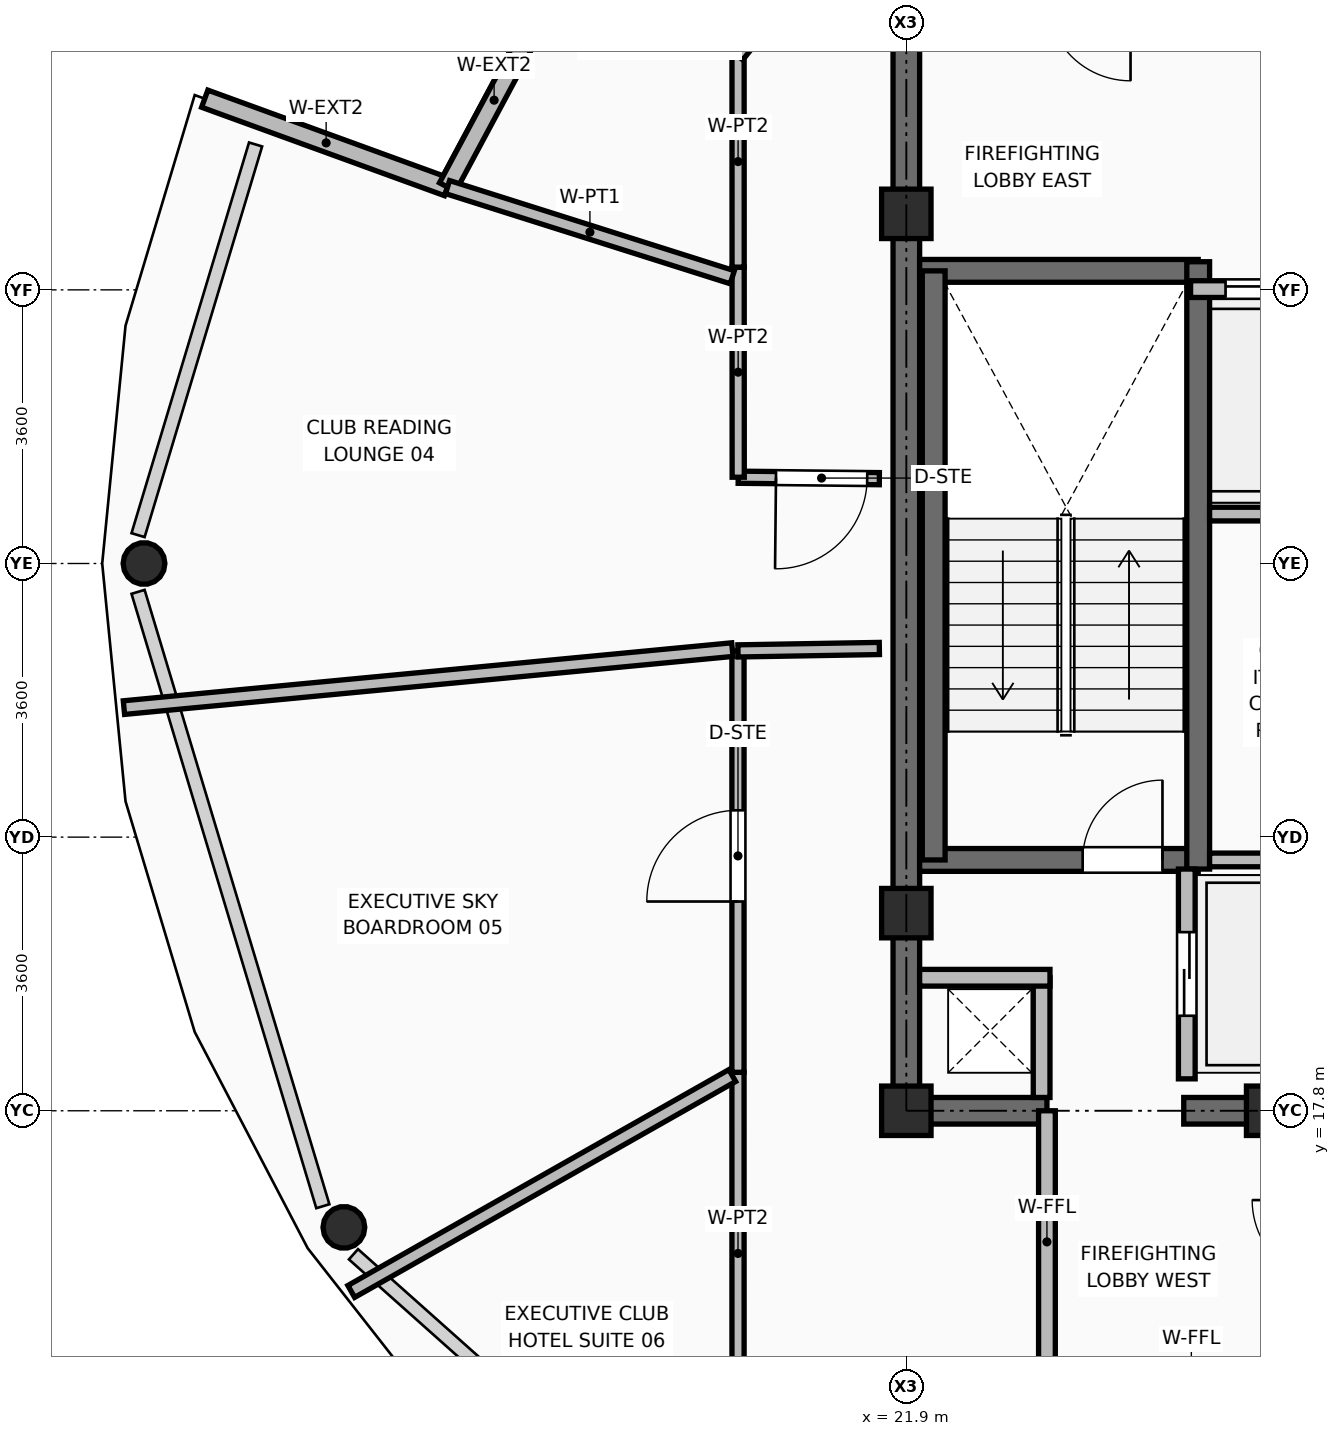
"""IFC4 building model, lengths in metres.
Left out: names, types, materials, properties, quantities, classifications, styles, units other than length and angle.
Written with IfcOpenShell. Run it as: python <this file> out.ifc"""

import sys

from ifc_helpers import new_model, si_unit, direction, frame, frame_2d, origin, origin_2d, place, context, subcontext, project, spatial, rectangle, hollow_circle, extrude, element, fill, save


model = new_model("IFC4")
c1 = context("Model", 3, precision=1e-05, world=origin(), true_north=direction((0.0, 1.0)))
c2 = subcontext(c1, "Body", "Model", "MODEL_VIEW")
j1 = project(units=[si_unit("LENGTHUNIT", "METRE"), si_unit("PLANEANGLEUNIT", "RADIAN")], contexts=[c1])
p1 = place(None, origin())
s1 = spatial("IfcSite", under=j1, at=p1, CompositionType="ELEMENT")
p2 = place(p1, origin())
s2 = spatial("IfcBuilding", under=s1, at=p2, CompositionType="ELEMENT")
p3 = place(p2, frame((0.0, 0.0, 275.1)))
s3 = spatial("IfcBuildingStorey", under=s2, at=p3, CompositionType="ELEMENT", Elevation=275.1)
for number, where, z_axis, x_axis in (
    (1, (21.9, 17.8, 0.0), (0.0, 0.0, 1.0), (1.0, 0.0, 0.0)),
    (2, (26.7, 17.8, 0.0), (0.0, 0.0, 1.0), (1.0, 0.0, 0.0)),
    (3, (21.9, 20.4, 0.0), (0.0, 0.0, 1.0), (1.0, 0.0, 0.0)),
    (4, (21.9, 29.6, 0.0), (0.0, 0.0, 1.0), (1.0, 0.0, 0.0)),
):
    element("IfcColumn", number, at=place(p3, frame(where, z_axis=z_axis, x_axis=x_axis)), inside=s3, PredefinedType="COLUMN", context=c2, shape_type="SweptSolid", body=[
        extrude(rectangle(XDim=0.65, YDim=0.65, at=origin_2d()), origin(), (0.0, 0.0, 1.0), 3.75),
    ])
p4 = place(p3, frame((11.87, 25.0, 0.0), z_axis=(0.022357971521, 0.0, 0.999750029312), x_axis=(0.0, 1.0, 0.0)))
e5 = element("IfcColumn", 5, at=p4, inside=s3, PredefinedType="COLUMN", context=c2, shape_type="SweptSolid", body=[
    extrude(hollow_circle(Radius=0.275, WallThickness=0.025, at=origin_2d()), origin(), (0.0, 0.0, 1.0), 3.571),
])
p5 = place(p3, frame((14.5, 16.266, 0.0), z_axis=(0.019349796045, 0.010050954129, 0.999762253595), x_axis=(-0.460957758055, 0.887422078432, 0.0)))
e6 = element("IfcColumn", 6, at=p5, inside=s3, PredefinedType="COLUMN", context=c2, shape_type="SweptSolid", body=[
    extrude(hollow_circle(Radius=0.275, WallThickness=0.025, at=origin_2d()), origin(), (0.0, 0.0, 1.0), 3.571),
])
p6 = place(p3, frame((15.864, 29.952, 0.0), z_axis=(0.0, 0.0, 1.0), x_axis=(-0.939675968745, 0.342065890968, 0.0)))
e7 = element("IfcWall", 7, at=p6, inside=s3, PredefinedType="SOLIDWALL", context=c2, shape_type="SweptSolid", body=[
    extrude(rectangle(XDim=3.4, YDim=0.24, at=frame_2d((1.7, 0.0))), origin(), (0.0, 0.0, 1.0), 3.57),
])
p7 = place(p3, frame((17.089, 32.239, 0.0), z_axis=(0.0, 0.0, 1.0), x_axis=(-0.472179632466, -0.881502350924, 0.0)))
e8 = element("IfcWall", 8, at=p7, inside=s3, PredefinedType="SOLIDWALL", context=c2, shape_type="SweptSolid", body=[
    extrude(rectangle(XDim=2.594, YDim=0.24, at=frame_2d((1.297, 0.0))), origin(), (0.0, 0.0, 1.0), 3.57),
])
p8 = place(p3, frame((21.725, 17.8, 0.0), z_axis=(0.0, 0.0, 1.0), x_axis=(1.0, 0.0, 0.0)))
e9 = element("IfcWall", 9, at=p8, inside=s3, PredefinedType="SHEAR", context=c2, shape_type="SweptSolid", body=[
    extrude(rectangle(XDim=2.025, YDim=0.35, at=frame_2d((1.012, 0.0))), origin(), (0.0, 0.0, 1.0), 3.57),
])
p9 = place(p3, frame((25.55, 17.8, 0.0), z_axis=(0.0, 0.0, 1.0), x_axis=(1.0, 0.0, 0.0)))
e10 = element("IfcWall", 10, at=p9, inside=s3, PredefinedType="SHEAR", context=c2, shape_type="SweptSolid", body=[
    extrude(rectangle(XDim=6.9, YDim=0.35, at=frame_2d((3.45, 0.0))), origin(), (0.0, 0.0, 1.0), 3.57),
])
p10 = place(p3, frame((21.9, 17.975, 0.0), z_axis=(0.0, 0.0, 1.0), x_axis=(0.0, 1.0, 0.0)))
e11 = element("IfcWall", 11, at=p10, inside=s3, PredefinedType="SHEAR", context=c2, shape_type="SweptSolid", body=[
    extrude(rectangle(XDim=14.3, YDim=0.35, at=frame_2d((7.15, 0.0))), origin(), (0.0, 0.0, 1.0), 3.57),
])
p11 = place(p3, frame((22.075, 21.1, 0.0), z_axis=(0.0, 0.0, 1.0), x_axis=(1.0, 0.0, 0.0)))
e12 = element("IfcWall", 12, at=p11, inside=s3, PredefinedType="SHEAR", context=c2, shape_type="SweptSolid", body=[
    extrude(rectangle(XDim=3.665, YDim=0.3, at=frame_2d((1.833, 0.0))), origin(), (0.0, 0.0, 1.0), 3.57),
])
p12 = place(p11, frame((2.145, 0.0, 0.0)))
e13 = element("IfcOpeningElement", 13, at=p12, cuts=e12, PredefinedType="OPENING", context=c2, shape_type="SweptSolid", body=[
    extrude(rectangle(XDim=1.05, YDim=2.1, at=frame_2d((0.525, 1.05))), frame((0.0, 0.16, 0.0), z_axis=(0.0, -1.0, 0.0), x_axis=(1.0, 0.0, 0.0)), (0.0, 0.0, 1.0), 0.32),
])
p13 = place(p3, frame((22.075, 28.85, 0.0), z_axis=(0.0, 0.0, 1.0), x_axis=(1.0, 0.0, 0.0)))
e14 = element("IfcWall", 14, at=p13, inside=s3, PredefinedType="SHEAR", context=c2, shape_type="SweptSolid", body=[
    extrude(rectangle(XDim=3.665, YDim=0.3, at=frame_2d((1.833, 0.0))), origin(), (0.0, 0.0, 1.0), 3.57),
])
p14 = place(p3, frame((25.74, 20.98, 0.0), z_axis=(0.0, 0.0, 1.0), x_axis=(0.0, 1.0, 0.0)))
e15 = element("IfcWall", 15, at=p14, inside=s3, PredefinedType="SHEAR", context=c2, shape_type="SweptSolid", body=[
    extrude(rectangle(XDim=7.99, YDim=0.3, at=frame_2d((3.995, 0.0))), origin(), (0.0, 0.0, 1.0), 3.57),
])
p15 = place(p3, frame((22.26, 21.1, 0.0), z_axis=(0.0, 0.0, 1.0), x_axis=(0.0, 1.0, 0.0)))
e16 = element("IfcWall", 16, at=p15, inside=s3, PredefinedType="SHEAR", context=c2, shape_type="SweptSolid", body=[
    extrude(rectangle(XDim=7.75, YDim=0.3, at=frame_2d((3.875, 0.0))), origin(), (0.0, 0.0, 1.0), 3.57),
])
p16 = place(p3, frame((23.68, 17.975, 0.0), z_axis=(0.0, 0.0, 1.0), x_axis=(0.0, 1.0, 0.0)))
e17 = element("IfcWall", 17, at=p16, inside=s3, PredefinedType="PARTITIONING", context=c2, shape_type="SweptSolid", body=[
    extrude(rectangle(XDim=1.575, YDim=0.22, at=frame_2d((0.788, 0.0))), origin(), (0.0, 0.0, 1.0), 3.132),
])
p17 = place(p3, frame((22.075, 19.55, 0.0), z_axis=(0.0, 0.0, 1.0), x_axis=(1.0, 0.0, 0.0)))
e18 = element("IfcWall", 18, at=p17, inside=s3, PredefinedType="PARTITIONING", context=c2, shape_type="SweptSolid", body=[
    extrude(rectangle(XDim=1.715, YDim=0.22, at=frame_2d((0.857, 0.0))), origin(), (0.0, 0.0, 1.0), 2.595),
])
p18 = place(p3, frame((25.59, 18.22, 0.0), z_axis=(0.0, 0.0, 1.0), x_axis=(0.0, 1.0, 0.0)))
e19 = element("IfcWall", 19, at=p18, inside=s3, PredefinedType="PARTITIONING", context=c2, shape_type="SweptSolid", body=[
    extrude(rectangle(XDim=2.76, YDim=0.22, at=frame_2d((1.38, 0.0))), origin(), (0.0, 0.0, 1.0), 3.55),
])
p19 = place(p18, frame((0.83, 0.0, 0.0)))
e20 = element("IfcOpeningElement", 20, at=p19, cuts=e19, PredefinedType="OPENING", context=c2, shape_type="SweptSolid", body=[
    extrude(rectangle(XDim=1.1, YDim=2.2, at=frame_2d((0.55, 1.1))), frame((0.0, 0.12, 0.0), z_axis=(0.0, -1.0, 0.0), x_axis=(1.0, 0.0, 0.0)), (0.0, 0.0, 1.0), 0.24),
])
p20 = place(p3, frame((25.64, 28.61, 0.0), z_axis=(0.0, 0.0, 1.0), x_axis=(1.0, 0.0, 0.0)))
e21 = element("IfcWall", 21, at=p20, inside=s3, PredefinedType="PARTITIONING", context=c2, shape_type="SweptSolid", body=[
    extrude(rectangle(XDim=2.02, YDim=0.22, at=frame_2d((1.01, 0.0))), origin(), (0.0, 0.0, 1.0), 3.55),
])
p21 = place(p20, frame((0.46, 0.0, 0.0)))
e22 = element("IfcOpeningElement", 22, at=p21, cuts=e21, PredefinedType="OPENING", context=c2, shape_type="SweptSolid", body=[
    extrude(rectangle(XDim=1.1, YDim=2.2, at=frame_2d((0.55, 1.1))), frame((0.0, 0.12, 0.0), z_axis=(0.0, -1.0, 0.0), x_axis=(1.0, 0.0, 0.0)), (0.0, 0.0, 1.0), 0.24),
])
for number, where, z_axis, x_axis in (
    (23, (25.89, 21.1, 0.0), (0.0, 0.0, 1.0), (1.0, 0.0, 0.0)),
    (24, (25.89, 25.65, 0.0), (0.0, 0.0, 1.0), (1.0, 0.0, 0.0)),
):
    element("IfcWall", number, at=place(p3, frame(where, z_axis=z_axis, x_axis=x_axis)), inside=s3, PredefinedType="PARTITIONING", context=c2, shape_type="SweptSolid", body=[
        extrude(rectangle(XDim=1.7, YDim=0.18, at=frame_2d((0.85, 0.0))), origin(), (0.0, 0.0, 1.0), 3.55),
    ])
p22 = place(p3, frame((23.75, 14.35, 0.0), z_axis=(0.0, 0.0, 1.0), x_axis=(0.0, 1.0, 0.0)))
e25 = element("IfcWall", 25, at=p22, inside=s3, PredefinedType="PARTITIONING", context=c2, shape_type="SweptSolid", body=[
    extrude(rectangle(XDim=3.45, YDim=0.22, at=frame_2d((1.725, 0.0))), origin(), (0.0, 0.0, 1.0), 3.132),
])
p23 = place(p3, frame((21.545, 26.116, 0.0), z_axis=(0.0, 0.0, 1.0), x_axis=(-0.999947421001, 0.010254522592, 0.0)))
e26 = element("IfcWall", 26, at=p23, inside=s3, PredefinedType="PARTITIONING", context=c2, shape_type="SweptSolid", body=[
    extrude(rectangle(XDim=1.857, YDim=0.16, at=frame_2d((0.928, 0.0))), origin(), (0.0, 0.0, 1.0), 2.595),
])
p24 = place(p23, frame((0.16, 0.0, 0.0)))
e27 = element("IfcOpeningElement", 27, at=p24, cuts=e26, PredefinedType="OPENING", context=c2, shape_type="SweptSolid", body=[
    extrude(rectangle(XDim=1.2, YDim=2.1, at=frame_2d((0.6, 1.05))), frame((0.0, 0.09, 0.0), z_axis=(0.0, -1.0, 0.0), x_axis=(1.0, 0.0, 0.0)), (0.0, 0.0, 1.0), 0.18),
])
p25 = place(p3, frame((19.688, 26.135, 0.0), z_axis=(0.0, 0.0, 1.0), x_axis=(-0.000353325656, 0.99999993758, 0.0)))
e28 = element("IfcWall", 28, at=p25, inside=s3, PredefinedType="PARTITIONING", context=c2, shape_type="SweptSolid", body=[
    extrude(rectangle(XDim=2.764, YDim=0.16, at=frame_2d((1.382, 0.0))), origin(), (0.0, 0.0, 1.0), 3.55),
])
p26 = place(p3, frame((19.687, 28.899, 0.0), z_axis=(0.0, 0.0, 1.0), x_axis=(-0.00035164833, 0.999999938172, 0.0)))
e29 = element("IfcWall", 29, at=p26, inside=s3, PredefinedType="PARTITIONING", context=c2, shape_type="SweptSolid", body=[
    extrude(rectangle(XDim=2.777, YDim=0.16, at=frame_2d((1.389, 0.0))), origin(), (0.0, 0.0, 1.0), 3.55),
])
p27 = place(p3, frame((19.686, 31.676, 0.0), z_axis=(0.0, 0.0, 1.0), x_axis=(0.623812554347, 0.781573986926, 0.0)))
e30 = element("IfcWall", 30, at=p27, inside=s3, PredefinedType="PARTITIONING", context=c2, shape_type="SweptSolid", body=[
    extrude(rectangle(XDim=1.249, YDim=0.16, at=frame_2d((0.625, 0.0))), origin(), (0.0, 0.0, 1.0), 3.132),
])
p28 = place(p3, frame((19.686, 13.54, 0.0), z_axis=(0.0, 0.0, 1.0), x_axis=(-0.000204907531, 0.999999979006, 0.0)))
e31 = element("IfcWall", 31, at=p28, inside=s3, PredefinedType="PARTITIONING", context=c2, shape_type="SweptSolid", body=[
    extrude(rectangle(XDim=4.766, YDim=0.16, at=frame_2d((2.383, 0.0))), origin(), (0.0, 0.0, 1.0), 3.132),
])
p29 = place(p3, frame((19.685, 18.306, 0.0), z_axis=(0.0, 0.0, 1.0), x_axis=(0.0, 1.0, 0.0)))
e32 = element("IfcWall", 32, at=p29, inside=s3, PredefinedType="PARTITIONING", context=c2, shape_type="SweptSolid", body=[
    extrude(rectangle(XDim=5.544, YDim=0.16, at=frame_2d((2.772, 0.0))), origin(), (0.0, 0.0, 1.0), 3.132),
])
p30 = place(p29, frame((2.247, 0.0, 0.0)))
e33 = element("IfcOpeningElement", 33, at=p30, cuts=e32, PredefinedType="OPENING", context=c2, shape_type="SweptSolid", body=[
    extrude(rectangle(XDim=1.2, YDim=2.1, at=frame_2d((0.6, 1.05))), frame((0.0, 0.09, 0.0), z_axis=(0.0, -1.0, 0.0), x_axis=(1.0, 0.0, 0.0)), (0.0, 0.0, 1.0), 0.18),
])
p31 = place(p3, frame((19.685, 23.85, 0.0), z_axis=(0.0, 0.0, 1.0), x_axis=(0.999852179606, 0.017193572529, 0.0)))
e34 = element("IfcWall", 34, at=p31, inside=s3, PredefinedType="PARTITIONING", context=c2, shape_type="SweptSolid", body=[
    extrude(rectangle(XDim=1.86, YDim=0.16, at=frame_2d((0.93, 0.0))), origin(), (0.0, 0.0, 1.0), 2.595),
])
p32 = place(p3, frame((19.61, 28.766, 0.0), z_axis=(0.0, 0.0, 1.0), x_axis=(-0.953376791754, 0.301782525909, 0.0)))
e35 = element("IfcWall", 35, at=p32, inside=s3, PredefinedType="PARTITIONING", context=c2, shape_type="SweptSolid", body=[
    extrude(rectangle(XDim=3.929, YDim=0.18, at=frame_2d((1.965, 0.0))), origin(), (0.0, 0.0, 1.0), 3.55),
])
p33 = place(p3, frame((19.611, 23.867, 0.0), z_axis=(0.0, 0.0, 1.0), x_axis=(-0.995489057096, -0.094876431225, 0.0)))
e36 = element("IfcWall", 36, at=p33, inside=s3, PredefinedType="PARTITIONING", context=c2, shape_type="SweptSolid", body=[
    extrude(rectangle(XDim=8.042, YDim=0.18, at=frame_2d((4.021, 0.0))), origin(), (0.0, 0.0, 1.0), 3.003),
])
p34 = place(p3, frame((19.61, 18.263, 0.0), z_axis=(0.0, 0.0, 1.0), x_axis=(-0.870093666081, -0.49288640907, 0.0)))
e37 = element("IfcWall", 37, at=p34, inside=s3, PredefinedType="PARTITIONING", context=c2, shape_type="SweptSolid", body=[
    extrude(rectangle(XDim=5.762, YDim=0.18, at=frame_2d((2.881, 0.0))), origin(), (0.0, 0.0, 1.0), 3.003),
])
p35 = place(p12, origin())
e38 = element("IfcDoor", 38, at=p35, inside=s3, OperationType="SINGLE_SWING_RIGHT", PredefinedType="DOOR", context=c2, shape_type="SweptSolid", body=[
    extrude(rectangle(XDim=1.05, YDim=2.1, at=frame_2d((0.525, 1.05))), frame((0.0, 0.025, 0.0), z_axis=(0.0, -1.0, 0.0), x_axis=(1.0, 0.0, 0.0)), (0.0, 0.0, 1.0), 0.05),
])
fill(e13, e38)
p36 = place(p19, origin())
e39 = element("IfcDoor", 39, at=p36, inside=s3, OperationType="DOUBLE_DOOR_SLIDING", PredefinedType="DOOR", context=c2, shape_type="SweptSolid", body=[
    extrude(rectangle(XDim=1.1, YDim=2.2, at=frame_2d((0.55, 1.1))), frame((0.0, 0.025, 0.0), z_axis=(0.0, -1.0, 0.0), x_axis=(1.0, 0.0, 0.0)), (0.0, 0.0, 1.0), 0.05),
])
fill(e20, e39)
p37 = place(p21, origin())
e40 = element("IfcDoor", 40, at=p37, inside=s3, OperationType="DOUBLE_DOOR_SLIDING", PredefinedType="DOOR", context=c2, shape_type="SweptSolid", body=[
    extrude(rectangle(XDim=1.1, YDim=2.2, at=frame_2d((0.55, 1.1))), frame((0.0, 0.025, 0.0), z_axis=(0.0, -1.0, 0.0), x_axis=(1.0, 0.0, 0.0)), (0.0, 0.0, 1.0), 0.05),
])
fill(e22, e40)
p38 = place(p24, origin())
e41 = element("IfcDoor", 41, at=p38, inside=s3, OperationType="SINGLE_SWING_RIGHT", PredefinedType="DOOR", context=c2, shape_type="SweptSolid", body=[
    extrude(rectangle(XDim=1.2, YDim=2.1, at=frame_2d((0.6, 1.05))), frame((0.0, 0.025, 0.0), z_axis=(0.0, -1.0, 0.0), x_axis=(1.0, 0.0, 0.0)), (0.0, 0.0, 1.0), 0.05),
])
fill(e27, e41)
p39 = place(p30, origin())
e42 = element("IfcDoor", 42, at=p39, inside=s3, OperationType="SINGLE_SWING_LEFT", PredefinedType="DOOR", context=c2, shape_type="SweptSolid", body=[
    extrude(rectangle(XDim=1.2, YDim=2.1, at=frame_2d((0.6, 1.05))), frame((0.0, 0.025, 0.0), z_axis=(0.0, -1.0, 0.0), x_axis=(1.0, 0.0, 0.0)), (0.0, 0.0, 1.0), 0.05),
])
fill(e33, e42)
save(model, sys.argv[1])
